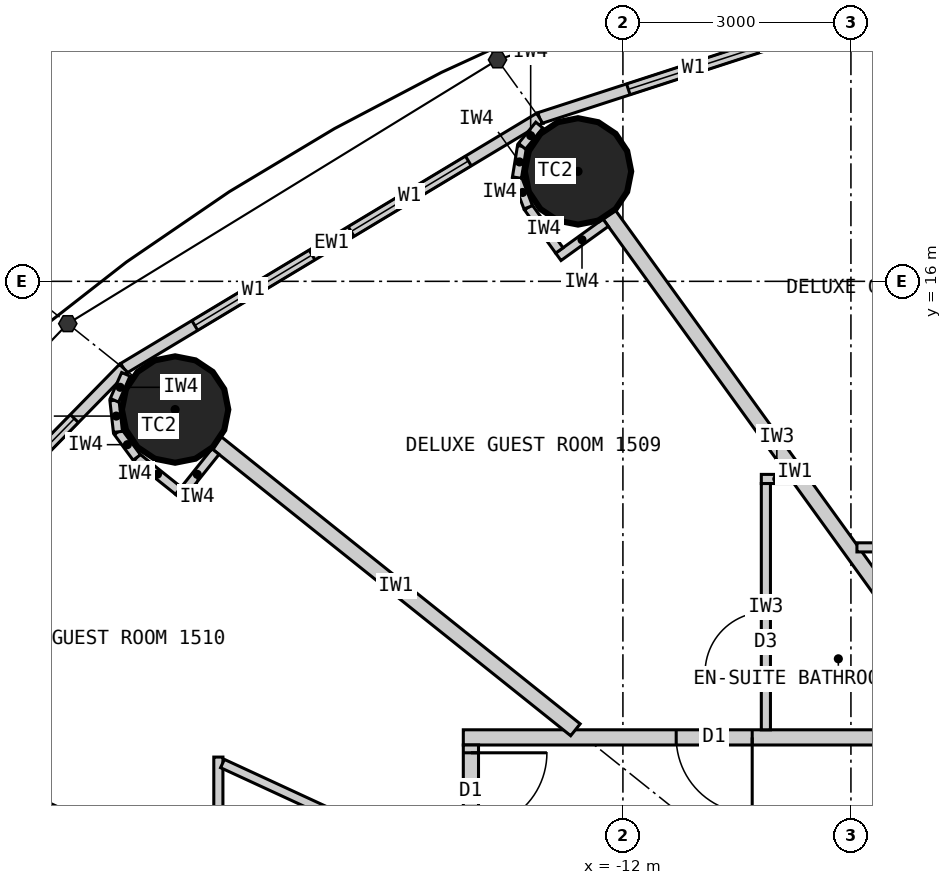
"""IFC4 building model, lengths in metres.
Left out: names, types, materials, properties, quantities, classifications, styles, units other than length and angle.
Written with IfcOpenShell. Run it as: python <this file> out.ifc"""

import sys

from ifc_helpers import new_model, si_unit, direction, frame, frame_2d, origin, origin_2d, place, context, subcontext, project, spatial, rectangle, circle, extrude, element, fill, save


model = new_model("IFC4")
c1 = context("Model", 3, precision=1e-05, world=origin(), true_north=direction((0.0, 1.0)))
c2 = subcontext(c1, "Body", "Model", "MODEL_VIEW")
j1 = project(units=[si_unit("LENGTHUNIT", "METRE"), si_unit("PLANEANGLEUNIT", "RADIAN")], contexts=[c1])
p1 = place(None, origin())
s1 = spatial("IfcSite", under=j1, at=p1, CompositionType="ELEMENT")
p2 = place(p1, origin())
s2 = spatial("IfcBuilding", under=s1, at=p2, CompositionType="ELEMENT")
p3 = place(p2, frame((0.0, 0.0, 63.9)))
s3 = spatial("IfcBuildingStorey", under=s2, at=p3, CompositionType="ELEMENT", Elevation=63.9)
for number, where, z_axis, x_axis in (
    (1, (-12.591, 17.447, 0.0), (0.0, 0.0, 1.0), (1.0, 0.0, 0.0)),
    (2, (-17.892, 14.313, 0.0), (0.0, 0.0, 1.0), (1.0, 0.0, 0.0)),
):
    element("IfcColumn", number, at=place(p3, frame(where, z_axis=z_axis, x_axis=x_axis)), inside=s3, PredefinedType="COLUMN", context=c2, shape_type="SweptSolid", body=[
        extrude(circle(Radius=0.7, at=origin_2d()), origin(), (0.0, 0.0, 1.0), 3.3),
    ])
p4 = place(p3, frame((-6.766, 20.202, 0.0), z_axis=(0.0, 0.0, 1.0), x_axis=(-0.951137534625, -0.308767534285, 0.0)))
e3 = element("IfcWall", 3, at=p4, inside=s3, PredefinedType="ELEMENTEDWALL", context=c2, shape_type="SweptSolid", body=[
    extrude(rectangle(XDim=6.655, YDim=0.15, at=frame_2d((3.328, 0.0))), origin(), (0.0, 0.0, 1.0), 3.12),
])
p5 = place(p4, frame((1.228, 0.0, 0.9)))
e4 = element("IfcOpeningElement", 4, at=p5, cuts=e3, PredefinedType="OPENING", context=c2, shape_type="SweptSolid", body=[
    extrude(rectangle(XDim=1.8, YDim=1.9, at=frame_2d((0.9, 0.95))), frame((0.0, 0.085, 0.0), z_axis=(0.0, -1.0, 0.0), x_axis=(1.0, 0.0, 0.0)), (0.0, 0.0, 1.0), 0.17),
])
p6 = place(p4, frame((3.628, 0.0, 0.9)))
e5 = element("IfcOpeningElement", 5, at=p6, cuts=e3, PredefinedType="OPENING", context=c2, shape_type="SweptSolid", body=[
    extrude(rectangle(XDim=1.8, YDim=1.9, at=frame_2d((0.9, 0.95))), frame((0.0, 0.085, 0.0), z_axis=(0.0, -1.0, 0.0), x_axis=(1.0, 0.0, 0.0)), (0.0, 0.0, 1.0), 0.17),
])
p7 = place(p3, frame((-13.096, 18.147, 0.0), z_axis=(0.0, 0.0, 1.0), x_axis=(-0.856983180864, -0.515344377787, 0.0)))
e6 = element("IfcWall", 6, at=p7, inside=s3, PredefinedType="ELEMENTEDWALL", context=c2, shape_type="SweptSolid", body=[
    extrude(rectangle(XDim=6.386, YDim=0.15, at=frame_2d((3.193, 0.0))), origin(), (0.0, 0.0, 1.0), 3.12),
])
p8 = place(p7, frame((1.093, 0.0, 0.9)))
e7 = element("IfcOpeningElement", 7, at=p8, cuts=e6, PredefinedType="OPENING", context=c2, shape_type="SweptSolid", body=[
    extrude(rectangle(XDim=1.8, YDim=1.9, at=frame_2d((0.9, 0.95))), frame((0.0, 0.085, 0.0), z_axis=(0.0, -1.0, 0.0), x_axis=(1.0, 0.0, 0.0)), (0.0, 0.0, 1.0), 0.17),
])
p9 = place(p7, frame((3.493, 0.0, 0.9)))
e8 = element("IfcOpeningElement", 8, at=p9, cuts=e6, PredefinedType="OPENING", context=c2, shape_type="SweptSolid", body=[
    extrude(rectangle(XDim=1.8, YDim=1.9, at=frame_2d((0.9, 0.95))), frame((0.0, 0.085, 0.0), z_axis=(0.0, -1.0, 0.0), x_axis=(1.0, 0.0, 0.0)), (0.0, 0.0, 1.0), 0.17),
])
p10 = place(p3, frame((-18.57, 14.856, 0.0), z_axis=(0.0, 0.0, 1.0), x_axis=(-0.699602905915, -0.714531856557, 0.0)))
e9 = element("IfcWall", 9, at=p10, inside=s3, PredefinedType="ELEMENTEDWALL", context=c2, shape_type="SweptSolid", body=[
    extrude(rectangle(XDim=6.051, YDim=0.15, at=frame_2d((3.025, 0.0))), origin(), (0.0, 0.0, 1.0), 3.12),
])
p11 = place(p10, frame((0.926, 0.0, 0.9)))
e10 = element("IfcOpeningElement", 10, at=p11, cuts=e9, PredefinedType="OPENING", context=c2, shape_type="SweptSolid", body=[
    extrude(rectangle(XDim=1.8, YDim=1.9, at=frame_2d((0.9, 0.95))), frame((0.0, 0.085, 0.0), z_axis=(0.0, -1.0, 0.0), x_axis=(1.0, 0.0, 0.0)), (0.0, 0.0, 1.0), 0.17),
])
p12 = place(p10, frame((3.325, 0.0, 0.9)))
e11 = element("IfcOpeningElement", 11, at=p12, cuts=e9, PredefinedType="OPENING", context=c2, shape_type="SweptSolid", body=[
    extrude(rectangle(XDim=1.8, YDim=1.9, at=frame_2d((0.9, 0.95))), frame((0.0, 0.085, 0.0), z_axis=(0.0, -1.0, 0.0), x_axis=(1.0, 0.0, 0.0)), (0.0, 0.0, 1.0), 0.17),
])
p13 = place(p3, frame((-14.1, 10.0, 0.0), z_axis=(0.0, 0.0, 1.0), x_axis=(1.0, 0.0, 0.0)))
e12 = element("IfcWall", 12, at=p13, inside=s3, PredefinedType="PARTITIONING", context=c2, shape_type="SweptSolid", body=[
    extrude(rectangle(XDim=28.2, YDim=0.2, at=frame_2d((14.1, 0.0))), origin(), (0.0, 0.0, 1.0), 3.12),
])
p14 = place(p13, frame((18.529, 0.0, 0.0)))
e13 = element("IfcOpeningElement", 13, at=p14, cuts=e12, PredefinedType="OPENING", context=c2, shape_type="SweptSolid", body=[
    extrude(rectangle(XDim=1.0, YDim=2.2, at=frame_2d((0.5, 1.1))), frame((0.0, 0.11, 0.0), z_axis=(0.0, -1.0, 0.0), x_axis=(1.0, 0.0, 0.0)), (0.0, 0.0, 1.0), 0.22),
])
p15 = place(p13, frame((14.623, 0.0, 0.0)))
e14 = element("IfcOpeningElement", 14, at=p15, cuts=e12, PredefinedType="OPENING", context=c2, shape_type="SweptSolid", body=[
    extrude(rectangle(XDim=1.0, YDim=2.2, at=frame_2d((0.5, 1.1))), frame((0.0, 0.11, 0.0), z_axis=(0.0, -1.0, 0.0), x_axis=(1.0, 0.0, 0.0)), (0.0, 0.0, 1.0), 0.22),
])
p16 = place(p13, frame((11.24, 0.0, 0.0)))
e15 = element("IfcOpeningElement", 15, at=p16, cuts=e12, PredefinedType="OPENING", context=c2, shape_type="SweptSolid", body=[
    extrude(rectangle(XDim=1.0, YDim=2.2, at=frame_2d((0.5, 1.1))), frame((0.0, 0.11, 0.0), z_axis=(0.0, -1.0, 0.0), x_axis=(1.0, 0.0, 0.0)), (0.0, 0.0, 1.0), 0.22),
])
p17 = place(p13, frame((8.671, 0.0, 0.0)))
e16 = element("IfcOpeningElement", 16, at=p17, cuts=e12, PredefinedType="OPENING", context=c2, shape_type="SweptSolid", body=[
    extrude(rectangle(XDim=1.0, YDim=2.2, at=frame_2d((0.5, 1.1))), frame((0.0, 0.11, 0.0), z_axis=(0.0, -1.0, 0.0), x_axis=(1.0, 0.0, 0.0)), (0.0, 0.0, 1.0), 0.22),
])
p18 = place(p13, frame((2.801, 0.0, 0.0)))
e17 = element("IfcOpeningElement", 17, at=p18, cuts=e12, PredefinedType="OPENING", context=c2, shape_type="SweptSolid", body=[
    extrude(rectangle(XDim=1.0, YDim=2.2, at=frame_2d((0.5, 1.1))), frame((0.0, 0.11, 0.0), z_axis=(0.0, -1.0, 0.0), x_axis=(1.0, 0.0, 0.0)), (0.0, 0.0, 1.0), 0.22),
])
p19 = place(p3, frame((-14.0, 9.9, 0.0), z_axis=(0.0, 0.0, 1.0), x_axis=(0.0, -1.0, 0.0)))
e18 = element("IfcWall", 18, at=p19, inside=s3, PredefinedType="PARTITIONING", context=c2, shape_type="SweptSolid", body=[
    extrude(rectangle(XDim=19.8, YDim=0.2, at=frame_2d((9.9, 0.0))), origin(), (0.0, 0.0, 1.0), 3.12),
])
p20 = place(p19, frame((0.103, 0.0, 0.0)))
e19 = element("IfcOpeningElement", 19, at=p20, cuts=e18, PredefinedType="OPENING", context=c2, shape_type="SweptSolid", body=[
    extrude(rectangle(XDim=1.0, YDim=2.2, at=frame_2d((0.5, 1.1))), frame((0.0, 0.11, 0.0), z_axis=(0.0, -1.0, 0.0), x_axis=(1.0, 0.0, 0.0)), (0.0, 0.0, 1.0), 0.22),
])
p21 = place(p19, frame((5.248, 0.0, 0.0)))
e20 = element("IfcOpeningElement", 20, at=p21, cuts=e18, PredefinedType="OPENING", context=c2, shape_type="SweptSolid", body=[
    extrude(rectangle(XDim=1.0, YDim=2.2, at=frame_2d((0.5, 1.1))), frame((0.0, 0.11, 0.0), z_axis=(0.0, -1.0, 0.0), x_axis=(1.0, 0.0, 0.0)), (0.0, 0.0, 1.0), 0.22),
])
p22 = place(p19, frame((9.438, 0.0, 0.0)))
e21 = element("IfcOpeningElement", 21, at=p22, cuts=e18, PredefinedType="OPENING", context=c2, shape_type="SweptSolid", body=[
    extrude(rectangle(XDim=1.0, YDim=2.2, at=frame_2d((0.5, 1.1))), frame((0.0, 0.11, 0.0), z_axis=(0.0, -1.0, 0.0), x_axis=(1.0, 0.0, 0.0)), (0.0, 0.0, 1.0), 0.22),
])
p23 = place(p19, frame((13.942, 0.0, 0.0)))
e22 = element("IfcOpeningElement", 22, at=p23, cuts=e18, PredefinedType="OPENING", context=c2, shape_type="SweptSolid", body=[
    extrude(rectangle(XDim=1.0, YDim=2.2, at=frame_2d((0.5, 1.1))), frame((0.0, 0.11, 0.0), z_axis=(0.0, -1.0, 0.0), x_axis=(1.0, 0.0, 0.0)), (0.0, 0.0, 1.0), 0.22),
])
p24 = place(p19, frame((18.698, 0.0, 0.0)))
e23 = element("IfcOpeningElement", 23, at=p24, cuts=e18, PredefinedType="OPENING", context=c2, shape_type="SweptSolid", body=[
    extrude(rectangle(XDim=1.0, YDim=2.2, at=frame_2d((0.5, 1.1))), frame((0.0, 0.11, 0.0), z_axis=(0.0, -1.0, 0.0), x_axis=(1.0, 0.0, 0.0)), (0.0, 0.0, 1.0), 0.22),
])
p25 = place(p3, frame((-7.289, 10.1, 0.0), z_axis=(0.0, 0.0, 1.0), x_axis=(-0.585198353053, 0.810890182197, 0.0)))
e24 = element("IfcWall", 24, at=p25, inside=s3, PredefinedType="PARTITIONING", context=c2, shape_type="SweptSolid", body=[
    extrude(rectangle(XDim=8.36, YDim=0.2, at=frame_2d((4.18, 0.0))), origin(), (0.0, 0.0, 1.0), 2.32),
])
p26 = place(p3, frame((-12.625, 10.1, 0.0), z_axis=(0.0, 0.0, 1.0), x_axis=(-0.780892451574, 0.624665493744, 0.0)))
e25 = element("IfcWall", 25, at=p26, inside=s3, PredefinedType="PARTITIONING", context=c2, shape_type="SweptSolid", body=[
    extrude(rectangle(XDim=6.045, YDim=0.2, at=frame_2d((3.022, 0.0))), origin(), (0.0, 0.0, 1.0), 2.32),
])
p27 = place(p3, frame((-14.1, 6.512, 0.0), z_axis=(0.0, 0.0, 1.0), x_axis=(-0.907832871056, 0.419332181247, 0.0)))
e26 = element("IfcWall", 26, at=p27, inside=s3, PredefinedType="PARTITIONING", context=c2, shape_type="SweptSolid", body=[
    extrude(rectangle(XDim=8.023, YDim=0.2, at=frame_2d((4.011, 0.0))), origin(), (0.0, 0.0, 1.0), 2.32),
])
p28 = place(p3, frame((-8.921, 12.5, 0.0), z_axis=(0.0, 0.0, 1.0), x_axis=(1.0, 0.0, 0.0)))
e27 = element("IfcWall", 27, at=p28, inside=s3, PredefinedType="PARTITIONING", context=c2, shape_type="SweptSolid", body=[
    extrude(rectangle(XDim=3.372, YDim=0.12, at=frame_2d((1.686, 0.0))), origin(), (0.0, 0.0, 1.0), 3.12),
])
p29 = place(p3, frame((-9.771, 13.4, 0.0), z_axis=(0.0, 0.0, 1.0), x_axis=(-1.0, 0.0, 0.0)))
e28 = element("IfcWall", 28, at=p29, inside=s3, PredefinedType="PARTITIONING", context=c2, shape_type="SweptSolid", body=[
    extrude(rectangle(XDim=0.408, YDim=0.12, at=frame_2d((0.204, 0.0))), origin(), (0.0, 0.0, 1.0), 3.12),
])
p30 = place(p3, frame((-10.119, 10.1, 0.0), z_axis=(0.0, 0.0, 1.0), x_axis=(0.0, 1.0, 0.0)))
e29 = element("IfcWall", 29, at=p30, inside=s3, PredefinedType="PARTITIONING", context=c2, shape_type="SweptSolid", body=[
    extrude(rectangle(XDim=3.24, YDim=0.12, at=frame_2d((1.62, 0.0))), origin(), (0.0, 0.0, 1.0), 3.12),
])
p31 = place(p30, frame((0.75, 0.0, 0.0)))
e30 = element("IfcOpeningElement", 30, at=p31, cuts=e29, PredefinedType="OPENING", context=c2, shape_type="SweptSolid", body=[
    extrude(rectangle(XDim=0.8, YDim=2.1, at=frame_2d((0.4, 1.05))), frame((0.0, 0.07, 0.0), z_axis=(0.0, -1.0, 0.0), x_axis=(1.0, 0.0, 0.0)), (0.0, 0.0, 1.0), 0.14),
])
p32 = place(p3, frame((-17.323, 8.101, 0.0), z_axis=(0.0, 0.0, 1.0), x_axis=(0.0, 1.0, 0.0)))
e31 = element("IfcWall", 31, at=p32, inside=s3, PredefinedType="PARTITIONING", context=c2, shape_type="SweptSolid", body=[
    extrude(rectangle(XDim=1.64, YDim=0.12, at=frame_2d((0.82, 0.0))), origin(), (0.0, 0.0, 1.0), 3.12),
])
p33 = place(p3, frame((-14.1, 8.193, 0.0), z_axis=(0.0, 0.0, 1.0), x_axis=(-0.907836493557, 0.419324338628, 0.0)))
e32 = element("IfcWall", 32, at=p33, inside=s3, PredefinedType="PARTITIONING", context=c2, shape_type="SweptSolid", body=[
    extrude(rectangle(XDim=3.49, YDim=0.12, at=frame_2d((1.745, 0.0))), origin(), (0.0, 0.0, 1.0), 3.12),
])
p34 = place(p33, frame((0.75, 0.0, 0.0)))
e33 = element("IfcOpeningElement", 33, at=p34, cuts=e32, PredefinedType="OPENING", context=c2, shape_type="SweptSolid", body=[
    extrude(rectangle(XDim=0.8, YDim=2.1, at=frame_2d((0.4, 1.05))), frame((0.0, 0.07, 0.0), z_axis=(0.0, -1.0, 0.0), x_axis=(1.0, 0.0, 0.0)), (0.0, 0.0, 1.0), 0.14),
])
p35 = place(p3, frame((-12.227, 16.772, 0.0), z_axis=(0.0, 0.0, 1.0), x_axis=(-0.810821798253, -0.585293098778, 0.0)))
e34 = element("IfcWall", 34, at=p35, inside=s3, PredefinedType="PARTITIONING", context=c2, shape_type="SweptSolid", body=[
    extrude(rectangle(XDim=0.768, YDim=0.12, at=frame_2d((0.384, 0.0))), origin(), (0.0, 0.0, 1.0), 3.12),
])
p36 = place(p3, frame((-12.836, 16.406, 0.0), z_axis=(0.0, 0.0, 1.0), x_axis=(-0.585223113993, 0.810872312296, 0.0)))
e35 = element("IfcWall", 35, at=p36, inside=s3, PredefinedType="PARTITIONING", context=c2, shape_type="SweptSolid", body=[
    extrude(rectangle(XDim=0.7, YDim=0.12, at=frame_2d((0.35, 0.0))), origin(), (0.0, 0.0, 1.0), 3.12),
])
p37 = place(p3, frame((-13.246, 16.974, 0.0), z_axis=(0.0, 0.0, 1.0), x_axis=(-0.355728122235, 0.934589483705, 0.0)))
e36 = element("IfcWall", 36, at=p37, inside=s3, PredefinedType="PARTITIONING", context=c2, shape_type="SweptSolid", body=[
    extrude(rectangle(XDim=0.418, YDim=0.12, at=frame_2d((0.209, 0.0))), origin(), (0.0, 0.0, 1.0), 3.12),
])
p38 = place(p3, frame((-13.394, 17.365, 0.0), z_axis=(0.0, 0.0, 1.0), x_axis=(0.159379276926, 0.987217425943, 0.0)))
e37 = element("IfcWall", 37, at=p38, inside=s3, PredefinedType="PARTITIONING", context=c2, shape_type="SweptSolid", body=[
    extrude(rectangle(XDim=0.418, YDim=0.12, at=frame_2d((0.209, 0.0))), origin(), (0.0, 0.0, 1.0), 3.12),
])
p39 = place(p3, frame((-13.328, 17.777, 0.0), z_axis=(0.0, 0.0, 1.0), x_axis=(0.632276783541, 0.774742582407, 0.0)))
e38 = element("IfcWall", 38, at=p39, inside=s3, PredefinedType="PARTITIONING", context=c2, shape_type="SweptSolid", body=[
    extrude(rectangle(XDim=0.36, YDim=0.12, at=frame_2d((0.18, 0.0))), origin(), (0.0, 0.0, 1.0), 3.12),
])
p40 = place(p3, frame((-17.361, 13.76, 0.0), z_axis=(0.0, 0.0, 1.0), x_axis=(-0.624501042889, -0.781023973659, 0.0)))
e39 = element("IfcWall", 39, at=p40, inside=s3, PredefinedType="PARTITIONING", context=c2, shape_type="SweptSolid", body=[
    extrude(rectangle(XDim=0.767, YDim=0.12, at=frame_2d((0.384, 0.0))), origin(), (0.0, 0.0, 1.0), 3.12),
])
p41 = place(p3, frame((-17.85, 13.246, 0.0), z_axis=(0.0, 0.0, 1.0), x_axis=(-0.780902834923, 0.62465251333, 0.0)))
e40 = element("IfcWall", 40, at=p41, inside=s3, PredefinedType="PARTITIONING", context=c2, shape_type="SweptSolid", body=[
    extrude(rectangle(XDim=0.7, YDim=0.12, at=frame_2d((0.35, 0.0))), origin(), (0.0, 0.0, 1.0), 3.12),
])
for number, where, z_axis, x_axis in (
    (41, (-18.396, 13.683, 0.0), (0.0, 0.0, 1.0), (-0.592, 0.806, 0.0)),
    (42, (-18.644, 14.02, 0.0), (0.0, 0.0, 1.0), (-0.11, 0.994, 0.0)),
):
    element("IfcWall", number, at=place(p3, frame(where, z_axis=z_axis, x_axis=x_axis)), inside=s3, PredefinedType="PARTITIONING", context=c2, shape_type="SweptSolid", body=[
        extrude(rectangle(XDim=0.418, YDim=0.12, at=frame_2d((0.209, 0.0))), origin(), (0.0, 0.0, 1.0), 3.12),
    ])
p42 = place(p3, frame((-18.69, 14.435, 0.0), z_axis=(0.0, 0.0, 1.0), x_axis=(0.401093412634, 0.91603715773, 0.0)))
e43 = element("IfcWall", 43, at=p42, inside=s3, PredefinedType="PARTITIONING", context=c2, shape_type="SweptSolid", body=[
    extrude(rectangle(XDim=0.373, YDim=0.12, at=frame_2d((0.187, 0.0))), origin(), (0.0, 0.0, 1.0), 3.12),
])
p43 = place(p6, origin())
e44 = element("IfcWindow", 44, at=p43, inside=s3, PartitioningType="SINGLE_PANEL", PredefinedType="WINDOW", context=c2, shape_type="SweptSolid", body=[
    extrude(rectangle(XDim=1.8, YDim=1.9, at=frame_2d((0.9, 0.95))), frame((0.0, 0.03, 0.0), z_axis=(0.0, -1.0, 0.0), x_axis=(1.0, 0.0, 0.0)), (0.0, 0.0, 1.0), 0.06),
])
fill(e5, e44)
p44 = place(p8, origin())
e45 = element("IfcWindow", 45, at=p44, inside=s3, PartitioningType="SINGLE_PANEL", PredefinedType="WINDOW", context=c2, shape_type="SweptSolid", body=[
    extrude(rectangle(XDim=1.8, YDim=1.9, at=frame_2d((0.9, 0.95))), frame((0.0, 0.03, 0.0), z_axis=(0.0, -1.0, 0.0), x_axis=(1.0, 0.0, 0.0)), (0.0, 0.0, 1.0), 0.06),
])
fill(e7, e45)
p45 = place(p9, origin())
e46 = element("IfcWindow", 46, at=p45, inside=s3, PartitioningType="SINGLE_PANEL", PredefinedType="WINDOW", context=c2, shape_type="SweptSolid", body=[
    extrude(rectangle(XDim=1.8, YDim=1.9, at=frame_2d((0.9, 0.95))), frame((0.0, 0.03, 0.0), z_axis=(0.0, -1.0, 0.0), x_axis=(1.0, 0.0, 0.0)), (0.0, 0.0, 1.0), 0.06),
])
fill(e8, e46)
p46 = place(p11, origin())
e47 = element("IfcWindow", 47, at=p46, inside=s3, PartitioningType="SINGLE_PANEL", PredefinedType="WINDOW", context=c2, shape_type="SweptSolid", body=[
    extrude(rectangle(XDim=1.8, YDim=1.9, at=frame_2d((0.9, 0.95))), frame((0.0, 0.03, 0.0), z_axis=(0.0, -1.0, 0.0), x_axis=(1.0, 0.0, 0.0)), (0.0, 0.0, 1.0), 0.06),
])
fill(e10, e47)
p47 = place(p31, origin())
e48 = element("IfcDoor", 48, at=p47, inside=s3, OperationType="SINGLE_SWING_LEFT", PredefinedType="DOOR", context=c2, shape_type="SweptSolid", body=[
    extrude(rectangle(XDim=0.8, YDim=2.1, at=frame_2d((0.4, 1.05))), frame((0.0, 0.025, 0.0), z_axis=(0.0, -1.0, 0.0), x_axis=(1.0, 0.0, 0.0)), (0.0, 0.0, 1.0), 0.05),
])
fill(e30, e48)
p48 = place(p18, origin())
e49 = element("IfcDoor", 49, at=p48, inside=s3, OperationType="SINGLE_SWING_RIGHT", PredefinedType="DOOR", context=c2, shape_type="SweptSolid", body=[
    extrude(rectangle(XDim=1.0, YDim=2.2, at=frame_2d((0.5, 1.1))), frame((0.0, 0.025, 0.0), z_axis=(0.0, -1.0, 0.0), x_axis=(1.0, 0.0, 0.0)), (0.0, 0.0, 1.0), 0.05),
])
fill(e17, e49)
p49 = place(p20, origin())
e50 = element("IfcDoor", 50, at=p49, inside=s3, OperationType="SINGLE_SWING_LEFT", PredefinedType="DOOR", context=c2, shape_type="SweptSolid", body=[
    extrude(rectangle(XDim=1.0, YDim=2.2, at=frame_2d((0.5, 1.1))), frame((0.0, 0.025, 0.0), z_axis=(0.0, -1.0, 0.0), x_axis=(1.0, 0.0, 0.0)), (0.0, 0.0, 1.0), 0.05),
])
fill(e19, e50)
save(model, sys.argv[1])
